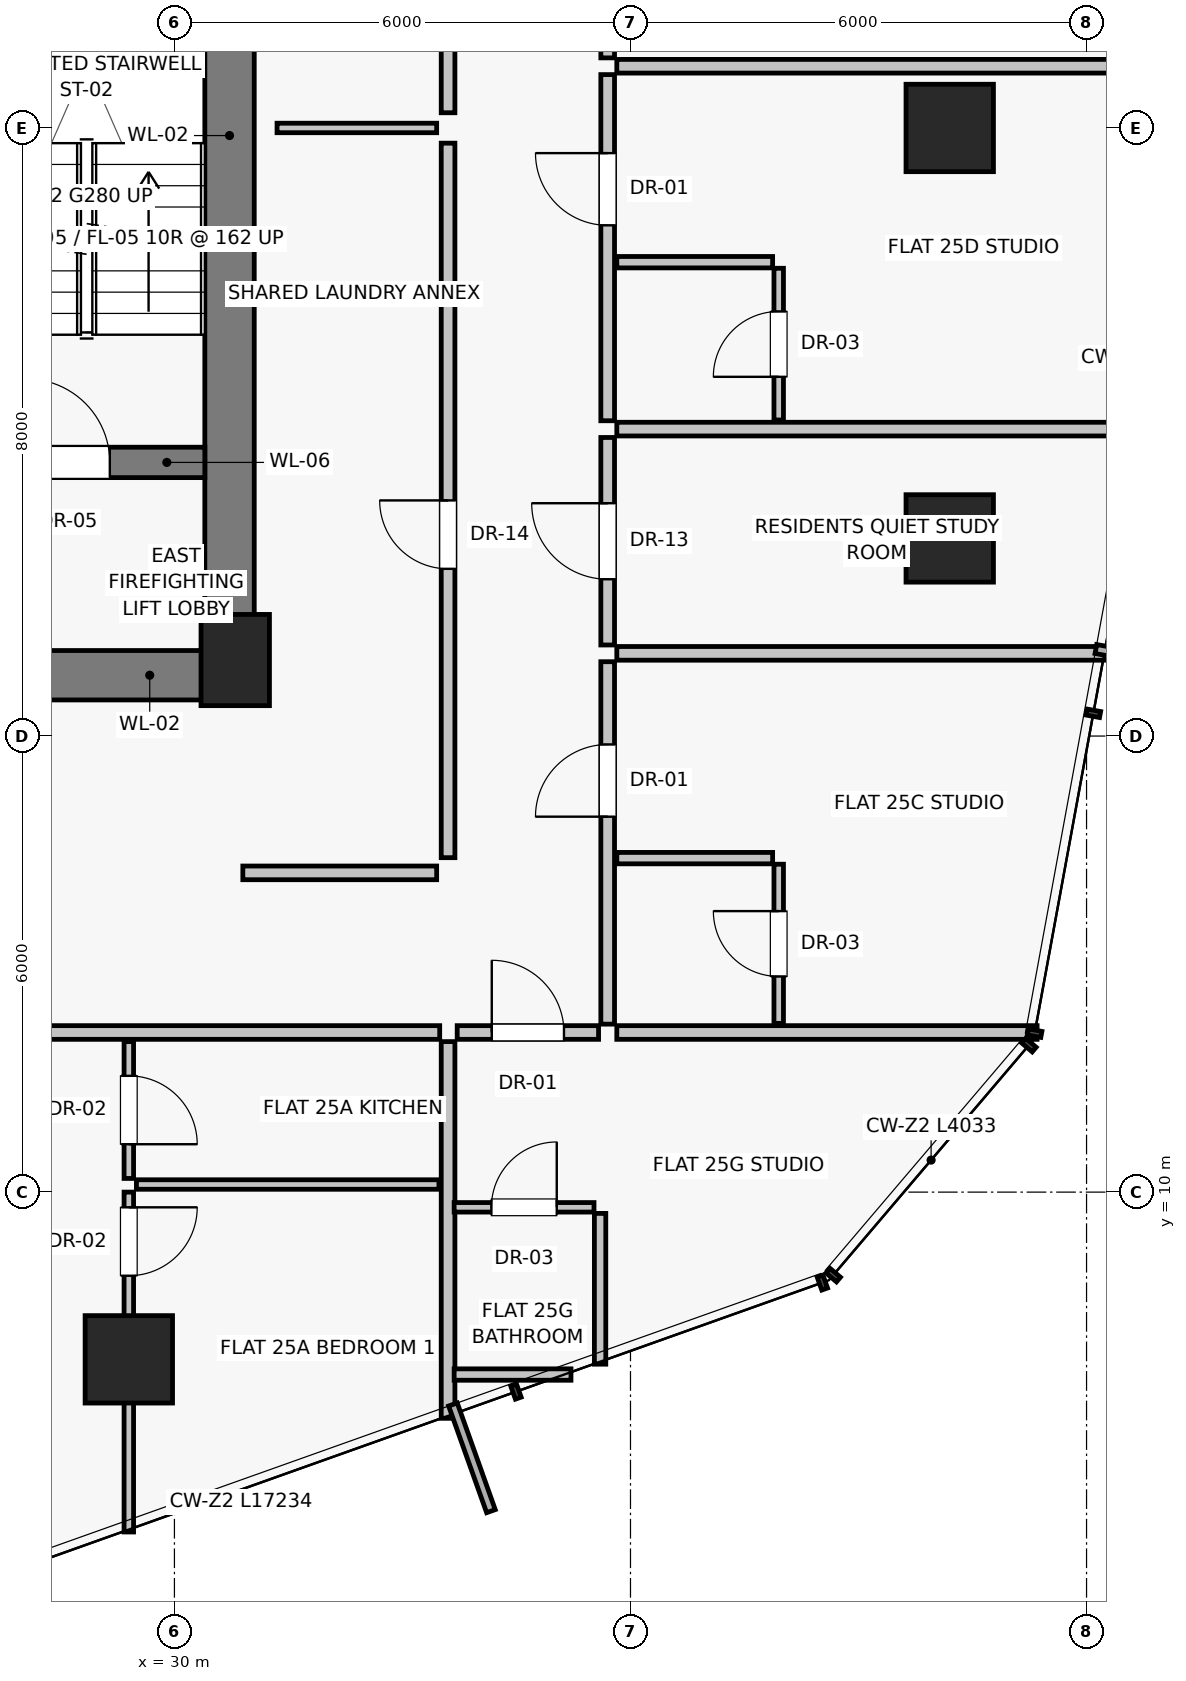
"""IFC4 building model, lengths in metres.
Left out: names, types, materials, properties, quantities, classifications, styles, units other than length and angle.
Written with IfcOpenShell. Run it as: python <this file> out.ifc"""

import sys

from ifc_helpers import new_model, si_unit, direction, frame, frame_2d, origin, origin_2d, place, context, subcontext, project, spatial, rectangle, extrude, source, transform, mapped, element, fill, save


model = new_model("IFC4")
c1 = context("Model", 3, precision=1e-05, world=origin(), true_north=direction((0.0, 1.0)))
c2 = subcontext(c1, "Body", "Model", "MODEL_VIEW")
j1 = project(units=[si_unit("LENGTHUNIT", "METRE"), si_unit("PLANEANGLEUNIT", "RADIAN")], contexts=[c1])
p1 = place(None, origin())
s1 = spatial("IfcSite", under=j1, at=p1, CompositionType="ELEMENT")
p2 = place(p1, origin())
s2 = spatial("IfcBuilding", under=s1, at=p2, CompositionType="ELEMENT")
p3 = place(p2, frame((0.0, 0.0, 92.7)))
s3 = spatial("IfcBuildingStorey", under=s2, at=p3, CompositionType="ELEMENT", Elevation=92.7)
p4 = place(p3, frame((30.8, 17.0, 0.0), z_axis=(0.0, 0.0, 1.0), x_axis=(1.0, 0.0, 0.0)))
e1 = element("IfcColumn", 1, at=p4, inside=s3, PredefinedType="PILASTER", context=c2, shape_type="SweptSolid", body=[
    extrude(rectangle(XDim=0.9, YDim=1.2, at=origin_2d()), origin(), (0.0, 0.0, 1.0), 3.25),
])
for number, where, z_axis, x_axis in (
    (2, (40.2, 18.6, 0.0), (0.0, 0.0, 1.0), (1.0, 0.0, 0.0)),
    (3, (40.2, 24.0, 0.0), (0.0, 0.0, 1.0), (1.0, 0.0, 0.0)),
    (4, (29.4, 7.8, 0.0), (0.0, 0.0, 1.0), (1.0, 0.0, 0.0)),
):
    element("IfcColumn", number, at=place(p3, frame(where, z_axis=z_axis, x_axis=x_axis)), inside=s3, PredefinedType="COLUMN", context=c2, shape_type="SweptSolid", body=[
        extrude(rectangle(XDim=1.15, YDim=1.15, at=origin_2d()), origin(), (0.0, 0.0, 1.0), 3.25),
    ])
p5 = place(p3, frame((30.725, 16.8, 0.0), z_axis=(0.0, 0.0, 1.0), x_axis=(0.0, 1.0, 0.0)))
e5 = element("IfcWall", 5, at=p5, inside=s3, PredefinedType="SHEAR", context=c2, shape_type="SweptSolid", body=[
    extrude(rectangle(XDim=14.2, YDim=0.65, at=frame_2d((7.1, 0.0))), origin(), (0.0, 0.0, 1.0), 3.0),
])
p6 = place(p3, frame((24.95, 16.8, 0.0), z_axis=(0.0, 0.0, 1.0), x_axis=(1.0, 0.0, 0.0)))
e6 = element("IfcWall", 6, at=p6, inside=s3, PredefinedType="SHEAR", context=c2, shape_type="SweptSolid", body=[
    extrude(rectangle(XDim=5.85, YDim=0.65, at=frame_2d((2.925, 0.0))), origin(), (0.0, 0.0, 1.0), 3.0),
])
p7 = place(p6, frame((2.15, 0.0, 0.0)))
e7 = element("IfcOpeningElement", 7, at=p7, cuts=e6, PredefinedType="OPENING", context=c2, shape_type="SweptSolid", body=[
    extrude(rectangle(XDim=1.2, YDim=2.03, at=frame_2d((0.6, 1.015))), frame((0.0, 0.335, 0.0), z_axis=(0.0, -1.0, 0.0), x_axis=(1.0, 0.0, 0.0)), (0.0, 0.0, 1.0), 0.67),
])
p8 = place(p3, frame((27.0, 19.6, 0.0), z_axis=(0.0, 0.0, 1.0), x_axis=(1.0, 0.0, 0.0)))
e8 = element("IfcWall", 8, at=p8, inside=s3, PredefinedType="SHEAR", context=c2, shape_type="SweptSolid", body=[
    extrude(rectangle(XDim=3.4, YDim=0.4, at=frame_2d((1.7, 0.0))), origin(), (0.0, 0.0, 1.0), 3.0),
])
p9 = place(p8, frame((1.05, 0.0, 0.0)))
e9 = element("IfcOpeningElement", 9, at=p9, cuts=e8, PredefinedType="OPENING", context=c2, shape_type="SweptSolid", body=[
    extrude(rectangle(XDim=1.1, YDim=2.03, at=frame_2d((0.55, 1.015))), frame((0.0, 0.21, 0.0), z_axis=(0.0, -1.0, 0.0), x_axis=(1.0, 0.0, 0.0)), (0.0, 0.0, 1.0), 0.42),
])
p10 = place(p3, frame((33.6, 14.4, 0.0), z_axis=(0.0, 0.0, 1.0), x_axis=(0.0, 1.0, 0.0)))
e10 = element("IfcWall", 10, at=p10, inside=s3, PredefinedType="PARTITIONING", context=c2, shape_type="SweptSolid", body=[
    extrude(rectangle(XDim=9.4, YDim=0.18, at=frame_2d((4.7, 0.0))), origin(), (0.0, 0.0, 1.0), 3.0),
])
p11 = place(p10, frame((3.8, 0.0, 0.0)))
e11 = element("IfcOpeningElement", 11, at=p11, cuts=e10, PredefinedType="OPENING", context=c2, shape_type="SweptSolid", body=[
    extrude(rectangle(XDim=0.9, YDim=2.01, at=frame_2d((0.45, 1.005))), frame((0.0, 0.1, 0.0), z_axis=(0.0, -1.0, 0.0), x_axis=(1.0, 0.0, 0.0)), (0.0, 0.0, 1.0), 0.2),
])
p12 = place(p3, frame((33.6, 24.2, 0.0), z_axis=(0.0, 0.0, 1.0), x_axis=(0.0, 1.0, 0.0)))
e12 = element("IfcWall", 12, at=p12, inside=s3, PredefinedType="PARTITIONING", context=c2, shape_type="SweptSolid", body=[
    extrude(rectangle(XDim=9.2, YDim=0.18, at=frame_2d((4.6, 0.0))), origin(), (0.0, 0.0, 1.0), 3.0),
])
p13 = place(p12, frame((3.8, 0.0, 0.0)))
e13 = element("IfcOpeningElement", 13, at=p13, cuts=e12, PredefinedType="OPENING", context=c2, shape_type="SweptSolid", body=[
    extrude(rectangle(XDim=0.9, YDim=2.01, at=frame_2d((0.45, 1.005))), frame((0.0, 0.1, 0.0), z_axis=(0.0, -1.0, 0.0), x_axis=(1.0, 0.0, 0.0)), (0.0, 0.0, 1.0), 0.2),
])
p14 = place(p3, frame((31.35, 24.0, 0.0), z_axis=(0.0, 0.0, 1.0), x_axis=(1.0, 0.0, 0.0)))
e14 = element("IfcWall", 14, at=p14, inside=s3, PredefinedType="PARTITIONING", context=c2, shape_type="SweptSolid", body=[
    extrude(rectangle(XDim=2.1, YDim=0.125, at=frame_2d((1.05, 0.0))), origin(), (0.0, 0.0, 1.0), 3.0),
])
p15 = place(p3, frame((30.9, 14.2, 0.0), z_axis=(0.0, 0.0, 1.0), x_axis=(1.0, 0.0, 0.0)))
e15 = element("IfcWall", 15, at=p15, inside=s3, PredefinedType="PARTITIONING", context=c2, shape_type="SweptSolid", body=[
    extrude(rectangle(XDim=2.55, YDim=0.18, at=frame_2d((1.275, 0.0))), origin(), (0.0, 0.0, 1.0), 3.0),
])
p16 = place(p3, frame((33.6, 11.98, 0.0), z_axis=(0.0, 0.0, 1.0), x_axis=(0.0, -1.0, 0.0)))
e16 = element("IfcWall", 16, at=p16, inside=s3, PredefinedType="PARTITIONING", context=c2, shape_type="SweptSolid", body=[
    extrude(rectangle(XDim=4.956, YDim=0.18, at=frame_2d((2.478, 0.0))), origin(), (0.0, 0.0, 1.0), 3.0),
])
p17 = place(p3, frame((18.71, 12.1, 0.0), z_axis=(0.0, 0.0, 1.0), x_axis=(1.0, 0.0, 0.0)))
e17 = element("IfcWall", 17, at=p17, inside=s3, PredefinedType="PARTITIONING", context=c2, shape_type="SweptSolid", body=[
    extrude(rectangle(XDim=14.78, YDim=0.18, at=frame_2d((7.39, 0.0))), origin(), (0.0, 0.0, 1.0), 2.58),
])
p18 = place(p17, frame((5.94, 0.0, 0.0)))
e18 = element("IfcOpeningElement", 18, at=p18, cuts=e17, PredefinedType="OPENING", context=c2, shape_type="SweptSolid", body=[
    extrude(rectangle(XDim=0.95, YDim=2.02, at=frame_2d((0.475, 1.01))), frame((0.0, 0.1, 0.0), z_axis=(0.0, -1.0, 0.0), x_axis=(1.0, 0.0, 0.0)), (0.0, 0.0, 1.0), 0.2),
])
p19 = place(p3, frame((29.4, 11.98, 0.0), z_axis=(0.0, 0.0, 1.0), x_axis=(0.0, -1.0, 0.0)))
e19 = element("IfcWall", 19, at=p19, inside=s3, PredefinedType="PARTITIONING", context=c2, shape_type="SweptSolid", body=[
    extrude(rectangle(XDim=1.8, YDim=0.125, at=frame_2d((0.9, 0.0))), origin(), (0.0, 0.0, 1.0), 2.378),
])
p20 = place(p19, frame((0.45, 0.0, 0.0)))
e20 = element("IfcOpeningElement", 20, at=p20, cuts=e19, PredefinedType="OPENING", context=c2, shape_type="SweptSolid", body=[
    extrude(rectangle(XDim=0.9, YDim=2.01, at=frame_2d((0.45, 1.005))), frame((0.0, 0.073, 0.0), z_axis=(0.0, -1.0, 0.0), x_axis=(1.0, 0.0, 0.0)), (0.0, 0.0, 1.0), 0.145),
])
p21 = place(p3, frame((29.5, 10.1, 0.0), z_axis=(0.0, 0.0, 1.0), x_axis=(1.0, 0.0, 0.0)))
e21 = element("IfcWall", 21, at=p21, inside=s3, PredefinedType="PARTITIONING", context=c2, shape_type="SweptSolid", body=[
    extrude(rectangle(XDim=3.98, YDim=0.125, at=frame_2d((1.99, 0.0))), origin(), (0.0, 0.0, 1.0), 3.0),
])
p22 = place(p3, frame((29.4, 10.0, 0.0), z_axis=(0.0, 0.0, 1.0), x_axis=(0.0, -1.0, 0.0)))
e22 = element("IfcWall", 22, at=p22, inside=s3, PredefinedType="PARTITIONING", context=c2, shape_type="SweptSolid", body=[
    extrude(rectangle(XDim=4.471, YDim=0.125, at=frame_2d((2.236, 0.0))), origin(), (0.0, 0.0, 1.0), 2.378),
])
p23 = place(p22, frame((0.2, 0.0, 0.0)))
e23 = element("IfcOpeningElement", 23, at=p23, cuts=e22, PredefinedType="OPENING", context=c2, shape_type="SweptSolid", body=[
    extrude(rectangle(XDim=0.9, YDim=2.01, at=frame_2d((0.45, 1.005))), frame((0.0, 0.073, 0.0), z_axis=(0.0, -1.0, 0.0), x_axis=(1.0, 0.0, 0.0)), (0.0, 0.0, 1.0), 0.145),
])
p24 = place(p3, frame((35.82, 12.1, 0.0), z_axis=(0.0, 0.0, 1.0), x_axis=(1.0, 0.0, 0.0)))
e24 = element("IfcWall", 24, at=p24, inside=s3, PredefinedType="PARTITIONING", context=c2, shape_type="SweptSolid", body=[
    extrude(rectangle(XDim=5.529, YDim=0.18, at=frame_2d((2.765, 0.0))), origin(), (0.0, 0.0, 1.0), 3.0),
])
p25 = place(p3, frame((35.7, 17.198, 0.0), z_axis=(0.0, 0.0, 1.0), x_axis=(0.0, 1.0, 0.0)))
e25 = element("IfcWall", 25, at=p25, inside=s3, PredefinedType="PARTITIONING", context=c2, shape_type="SweptSolid", body=[
    extrude(rectangle(XDim=2.73, YDim=0.18, at=frame_2d((1.365, 0.0))), origin(), (0.0, 0.0, 1.0), 2.58),
])
p26 = place(p25, frame((0.865, 0.0, 0.0)))
e26 = element("IfcOpeningElement", 26, at=p26, cuts=e25, PredefinedType="OPENING", context=c2, shape_type="SweptSolid", body=[
    extrude(rectangle(XDim=1.0, YDim=2.01, at=frame_2d((0.5, 1.005))), frame((0.0, 0.1, 0.0), z_axis=(0.0, -1.0, 0.0), x_axis=(1.0, 0.0, 0.0)), (0.0, 0.0, 1.0), 0.2),
])
p27 = place(p3, frame((35.82, 17.088, 0.0), z_axis=(0.0, 0.0, 1.0), x_axis=(1.0, 0.0, 0.0)))
e27 = element("IfcWall", 27, at=p27, inside=s3, PredefinedType="PARTITIONING", context=c2, shape_type="SweptSolid", body=[
    extrude(rectangle(XDim=6.445, YDim=0.18, at=frame_2d((3.222, 0.0))), origin(), (0.0, 0.0, 1.0), 3.0),
])
p28 = place(p3, frame((35.7, 12.21, 0.0), z_axis=(0.0, 0.0, 1.0), x_axis=(0.0, 1.0, 0.0)))
e28 = element("IfcWall", 28, at=p28, inside=s3, PredefinedType="PARTITIONING", context=c2, shape_type="SweptSolid", body=[
    extrude(rectangle(XDim=4.768, YDim=0.18, at=frame_2d((2.384, 0.0))), origin(), (0.0, 0.0, 1.0), 3.0),
])
p29 = place(p28, frame((2.729, 0.0, 0.0)))
e29 = element("IfcOpeningElement", 29, at=p29, cuts=e28, PredefinedType="OPENING", context=c2, shape_type="SweptSolid", body=[
    extrude(rectangle(XDim=0.95, YDim=2.02, at=frame_2d((0.475, 1.01))), frame((0.0, 0.1, 0.0), z_axis=(0.0, -1.0, 0.0), x_axis=(1.0, 0.0, 0.0)), (0.0, 0.0, 1.0), 0.2),
])
p30 = place(p3, frame((35.82, 14.394, 0.0), z_axis=(0.0, 0.0, 1.0), x_axis=(1.0, 0.0, 0.0)))
e30 = element("IfcWall", 30, at=p30, inside=s3, PredefinedType="PARTITIONING", context=c2, shape_type="SweptSolid", body=[
    extrude(rectangle(XDim=2.05, YDim=0.15, at=frame_2d((1.025, 0.0))), origin(), (0.0, 0.0, 1.0), 3.0),
])
p31 = place(p3, frame((37.95, 12.22, 0.0), z_axis=(0.0, 0.0, 1.0), x_axis=(0.0, 1.0, 0.0)))
e31 = element("IfcWall", 31, at=p31, inside=s3, PredefinedType="PARTITIONING", context=c2, shape_type="SweptSolid", body=[
    extrude(rectangle(XDim=2.094, YDim=0.125, at=frame_2d((1.047, 0.0))), origin(), (0.0, 0.0, 1.0), 3.0),
])
p32 = place(p31, frame((0.617, 0.0, 0.0)))
e32 = element("IfcOpeningElement", 32, at=p32, cuts=e31, PredefinedType="OPENING", context=c2, shape_type="SweptSolid", body=[
    extrude(rectangle(XDim=0.86, YDim=2.01, at=frame_2d((0.43, 1.005))), frame((0.0, 0.073, 0.0), z_axis=(0.0, -1.0, 0.0), x_axis=(1.0, 0.0, 0.0)), (0.0, 0.0, 1.0), 0.145),
])
p33 = place(p3, frame((35.82, 20.038, 0.0), z_axis=(0.0, 0.0, 1.0), x_axis=(1.0, 0.0, 0.0)))
e33 = element("IfcWall", 33, at=p33, inside=s3, PredefinedType="PARTITIONING", context=c2, shape_type="SweptSolid", body=[
    extrude(rectangle(XDim=6.986, YDim=0.18, at=frame_2d((3.493, 0.0))), origin(), (0.0, 0.0, 1.0), 3.0),
])
p34 = place(p3, frame((35.7, 24.922, 0.0), z_axis=(0.0, 0.0, 1.0), x_axis=(0.0, 1.0, 0.0)))
e34 = element("IfcWall", 34, at=p34, inside=s3, PredefinedType="PARTITIONING", context=c2, shape_type="SweptSolid", body=[
    extrude(rectangle(XDim=2.73, YDim=0.18, at=frame_2d((1.365, 0.0))), origin(), (0.0, 0.0, 1.0), 2.58),
])
p35 = place(p34, frame((0.865, 0.0, 0.0)))
e35 = element("IfcOpeningElement", 35, at=p35, cuts=e34, PredefinedType="OPENING", context=c2, shape_type="SweptSolid", body=[
    extrude(rectangle(XDim=1.0, YDim=2.01, at=frame_2d((0.5, 1.005))), frame((0.0, 0.1, 0.0), z_axis=(0.0, -1.0, 0.0), x_axis=(1.0, 0.0, 0.0)), (0.0, 0.0, 1.0), 0.2),
])
p36 = place(p3, frame((35.82, 24.812, 0.0), z_axis=(0.0, 0.0, 1.0), x_axis=(1.0, 0.0, 0.0)))
e36 = element("IfcWall", 36, at=p36, inside=s3, PredefinedType="PARTITIONING", context=c2, shape_type="SweptSolid", body=[
    extrude(rectangle(XDim=7.862, YDim=0.18, at=frame_2d((3.931, 0.0))), origin(), (0.0, 0.0, 1.0), 3.0),
])
p37 = place(p3, frame((35.7, 20.148, 0.0), z_axis=(0.0, 0.0, 1.0), x_axis=(0.0, 1.0, 0.0)))
e37 = element("IfcWall", 37, at=p37, inside=s3, PredefinedType="PARTITIONING", context=c2, shape_type="SweptSolid", body=[
    extrude(rectangle(XDim=4.554, YDim=0.18, at=frame_2d((2.277, 0.0))), origin(), (0.0, 0.0, 1.0), 2.58),
])
p38 = place(p37, frame((2.571, 0.0, 0.0)))
e38 = element("IfcOpeningElement", 38, at=p38, cuts=e37, PredefinedType="OPENING", context=c2, shape_type="SweptSolid", body=[
    extrude(rectangle(XDim=0.95, YDim=2.02, at=frame_2d((0.475, 1.01))), frame((0.0, 0.1, 0.0), z_axis=(0.0, -1.0, 0.0), x_axis=(1.0, 0.0, 0.0)), (0.0, 0.0, 1.0), 0.2),
])
p39 = place(p3, frame((35.82, 22.234, 0.0), z_axis=(0.0, 0.0, 1.0), x_axis=(1.0, 0.0, 0.0)))
e39 = element("IfcWall", 39, at=p39, inside=s3, PredefinedType="PARTITIONING", context=c2, shape_type="SweptSolid", body=[
    extrude(rectangle(XDim=2.05, YDim=0.15, at=frame_2d((1.025, 0.0))), origin(), (0.0, 0.0, 1.0), 3.0),
])
p40 = place(p3, frame((37.95, 20.158, 0.0), z_axis=(0.0, 0.0, 1.0), x_axis=(0.0, 1.0, 0.0)))
e40 = element("IfcWall", 40, at=p40, inside=s3, PredefinedType="PARTITIONING", context=c2, shape_type="SweptSolid", body=[
    extrude(rectangle(XDim=1.996, YDim=0.125, at=frame_2d((0.998, 0.0))), origin(), (0.0, 0.0, 1.0), 3.0),
])
p41 = place(p40, frame((0.568, 0.0, 0.0)))
e41 = element("IfcOpeningElement", 41, at=p41, cuts=e40, PredefinedType="OPENING", context=c2, shape_type="SweptSolid", body=[
    extrude(rectangle(XDim=0.86, YDim=2.01, at=frame_2d((0.43, 1.005))), frame((0.0, 0.073, 0.0), z_axis=(0.0, -1.0, 0.0), x_axis=(1.0, 0.0, 0.0)), (0.0, 0.0, 1.0), 0.145),
])
p42 = place(p3, frame((33.72, 12.1, 0.0), z_axis=(0.0, 0.0, 1.0), x_axis=(1.0, 0.0, 0.0)))
e42 = element("IfcWall", 42, at=p42, inside=s3, PredefinedType="PARTITIONING", context=c2, shape_type="SweptSolid", body=[
    extrude(rectangle(XDim=1.86, YDim=0.18, at=frame_2d((0.93, 0.0))), origin(), (0.0, 0.0, 1.0), 3.0),
])
p43 = place(p42, frame((0.455, 0.0, 0.0)))
e43 = element("IfcOpeningElement", 43, at=p43, cuts=e42, PredefinedType="OPENING", context=c2, shape_type="SweptSolid", body=[
    extrude(rectangle(XDim=0.95, YDim=2.02, at=frame_2d((0.475, 1.01))), frame((0.0, 0.1, 0.0), z_axis=(0.0, -1.0, 0.0), x_axis=(1.0, 0.0, 0.0)), (0.0, 0.0, 1.0), 0.2),
])
p44 = place(p3, frame((33.68, 9.8, 0.0), z_axis=(0.0, 0.0, 1.0), x_axis=(1.0, 0.0, 0.0)))
e44 = element("IfcWall", 44, at=p44, inside=s3, PredefinedType="PARTITIONING", context=c2, shape_type="SweptSolid", body=[
    extrude(rectangle(XDim=1.84, YDim=0.125, at=frame_2d((0.92, 0.0))), origin(), (0.0, 0.0, 1.0), 3.0),
])
p45 = place(p44, frame((0.49, 0.0, 0.0)))
e45 = element("IfcOpeningElement", 45, at=p45, cuts=e44, PredefinedType="OPENING", context=c2, shape_type="SweptSolid", body=[
    extrude(rectangle(XDim=0.86, YDim=2.01, at=frame_2d((0.43, 1.005))), frame((0.0, 0.073, 0.0), z_axis=(0.0, -1.0, 0.0), x_axis=(1.0, 0.0, 0.0)), (0.0, 0.0, 1.0), 0.145),
])
p46 = place(p3, frame((33.68, 7.6, 0.0), z_axis=(0.0, 0.0, 1.0), x_axis=(1.0, 0.0, 0.0)))
e46 = element("IfcWall", 46, at=p46, inside=s3, PredefinedType="PARTITIONING", context=c2, shape_type="SweptSolid", body=[
    extrude(rectangle(XDim=1.537, YDim=0.15, at=frame_2d((0.769, 0.0))), origin(), (0.0, 0.0, 1.0), 3.0),
])
p47 = place(p3, frame((35.6, 7.736, 0.0), z_axis=(0.0, 0.0, 1.0), x_axis=(0.0, 1.0, 0.0)))
e47 = element("IfcWall", 47, at=p47, inside=s3, PredefinedType="PARTITIONING", context=c2, shape_type="SweptSolid", body=[
    extrude(rectangle(XDim=1.984, YDim=0.15, at=frame_2d((0.992, 0.0))), origin(), (0.0, 0.0, 1.0), 3.0),
])
m1 = source(origin(), c2, "Body", "SweptSolid", [
    extrude(rectangle(XDim=1.1, YDim=2.03, at=frame_2d((0.55, 1.015))), frame((0.0, 0.025, 0.0), z_axis=(0.0, -1.0, 0.0), x_axis=(1.0, 0.0, 0.0)), (0.0, 0.0, 1.0), 0.05),
])
p48 = place(p9, origin())
e48 = element("IfcDoor", 48, at=p48, inside=s3, OperationType="SINGLE_SWING_LEFT", PredefinedType="DOOR", context=c2, shape_type="MappedRepresentation", body=[
    mapped(m1, transform((0.0, 0.0, 0.0), scale=1.0)),
])
fill(e9, e48)
m2 = source(origin(), c2, "Body", "SweptSolid", [
    extrude(rectangle(XDim=0.9, YDim=2.01, at=frame_2d((0.45, 1.005))), frame((0.0, 0.025, 0.0), z_axis=(0.0, -1.0, 0.0), x_axis=(1.0, 0.0, 0.0)), (0.0, 0.0, 1.0), 0.05),
])
p49 = place(p11, origin())
e49 = element("IfcDoor", 49, at=p49, inside=s3, OperationType="SINGLE_SWING_RIGHT", PredefinedType="DOOR", context=c2, shape_type="MappedRepresentation", body=[
    mapped(m2, transform((0.0, 0.0, 0.0), scale=1.0)),
])
fill(e11, e49)
p50 = place(p20, origin())
e50 = element("IfcDoor", 50, at=p50, inside=s3, OperationType="SINGLE_SWING_RIGHT", PredefinedType="DOOR", context=c2, shape_type="MappedRepresentation", body=[
    mapped(m2, transform((0.0, 0.0, 0.0), scale=1.0)),
])
fill(e20, e50)
p51 = place(p23, origin())
e51 = element("IfcDoor", 51, at=p51, inside=s3, OperationType="SINGLE_SWING_LEFT", PredefinedType="DOOR", context=c2, shape_type="MappedRepresentation", body=[
    mapped(m2, transform((0.0, 0.0, 0.0), scale=1.0)),
])
fill(e23, e51)
m3 = source(origin(), c2, "Body", "SweptSolid", [
    extrude(rectangle(XDim=1.0, YDim=2.01, at=frame_2d((0.5, 1.005))), frame((0.0, 0.025, 0.0), z_axis=(0.0, -1.0, 0.0), x_axis=(1.0, 0.0, 0.0)), (0.0, 0.0, 1.0), 0.05),
])
p52 = place(p26, origin())
e52 = element("IfcDoor", 52, at=p52, inside=s3, OperationType="SINGLE_SWING_RIGHT", PredefinedType="DOOR", context=c2, shape_type="MappedRepresentation", body=[
    mapped(m3, transform((0.0, 0.0, 0.0), scale=1.0)),
])
fill(e26, e52)
m4 = source(origin(), c2, "Body", "SweptSolid", [
    extrude(rectangle(XDim=0.95, YDim=2.02, at=frame_2d((0.475, 1.01))), frame((0.0, 0.025, 0.0), z_axis=(0.0, -1.0, 0.0), x_axis=(1.0, 0.0, 0.0)), (0.0, 0.0, 1.0), 0.05),
])
p53 = place(p29, origin())
e53 = element("IfcDoor", 53, at=p53, inside=s3, OperationType="SINGLE_SWING_LEFT", PredefinedType="DOOR", context=c2, shape_type="MappedRepresentation", body=[
    mapped(m4, transform((0.0, 0.0, 0.0), scale=1.0)),
])
fill(e29, e53)
m5 = source(origin(), c2, "Body", "SweptSolid", [
    extrude(rectangle(XDim=0.86, YDim=2.01, at=frame_2d((0.43, 1.005))), frame((0.0, 0.025, 0.0), z_axis=(0.0, -1.0, 0.0), x_axis=(1.0, 0.0, 0.0)), (0.0, 0.0, 1.0), 0.05),
])
p54 = place(p32, origin())
e54 = element("IfcDoor", 54, at=p54, inside=s3, OperationType="SINGLE_SWING_RIGHT", PredefinedType="DOOR", context=c2, shape_type="MappedRepresentation", body=[
    mapped(m5, transform((0.0, 0.0, 0.0), scale=1.0)),
])
fill(e32, e54)
p55 = place(p38, origin())
e55 = element("IfcDoor", 55, at=p55, inside=s3, OperationType="SINGLE_SWING_RIGHT", PredefinedType="DOOR", context=c2, shape_type="MappedRepresentation", body=[
    mapped(m4, transform((0.0, 0.0, 0.0), scale=1.0)),
])
fill(e38, e55)
p56 = place(p41, origin())
e56 = element("IfcDoor", 56, at=p56, inside=s3, OperationType="SINGLE_SWING_LEFT", PredefinedType="DOOR", context=c2, shape_type="MappedRepresentation", body=[
    mapped(m5, transform((0.0, 0.0, 0.0), scale=1.0)),
])
fill(e41, e56)
p57 = place(p43, origin())
e57 = element("IfcDoor", 57, at=p57, inside=s3, OperationType="SINGLE_SWING_LEFT", PredefinedType="DOOR", context=c2, shape_type="MappedRepresentation", body=[
    mapped(m4, transform((0.0, 0.0, 0.0), scale=1.0)),
])
fill(e43, e57)
p58 = place(p45, origin())
e58 = element("IfcDoor", 58, at=p58, inside=s3, OperationType="SINGLE_SWING_RIGHT", PredefinedType="DOOR", context=c2, shape_type="MappedRepresentation", body=[
    mapped(m5, transform((0.0, 0.0, 0.0), scale=1.0)),
])
fill(e45, e58)
save(model, sys.argv[1])
